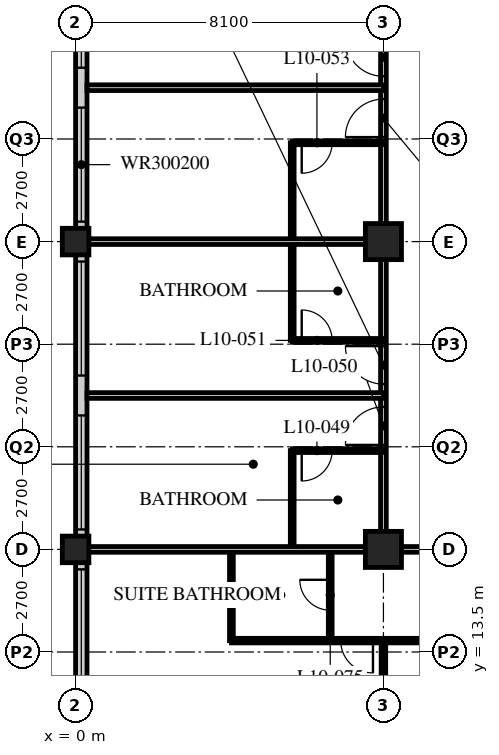
"""IFC4 building model, lengths in metres.
Left out: names, types, materials, properties, quantities, classifications, styles, units other than length and angle.
Written with IfcOpenShell. Run it as: python <this file> out.ifc"""

import sys

from ifc_helpers import new_model, si_unit, direction, frame, frame_2d, origin, origin_2d, place, context, subcontext, project, spatial, rectangle, hollow_rectangle, extrude, element, fill, save


model = new_model("IFC4")
c1 = context("Model", 3, precision=1e-05, world=origin(), true_north=direction((0.0, 1.0)))
c2 = subcontext(c1, "Body", "Model", "MODEL_VIEW")
j1 = project(units=[si_unit("LENGTHUNIT", "METRE"), si_unit("PLANEANGLEUNIT", "RADIAN")], contexts=[c1])
p1 = place(None, origin())
s1 = spatial("IfcSite", under=j1, at=p1, CompositionType="ELEMENT")
p2 = place(p1, origin())
s2 = spatial("IfcBuilding", under=s1, at=p2, CompositionType="ELEMENT")
p3 = place(p2, frame((0.0, 0.0, 46.6)))
s3 = spatial("IfcBuildingStorey", under=s2, at=p3, CompositionType="ELEMENT", Elevation=46.6)
for number, where, z_axis, x_axis in (
    (1, (0.0, 16.2, 0.0), (0.0, 0.0, 1.0), (1.0, 0.0, 0.0)),
    (2, (0.0, 24.3, 0.0), (0.0, 0.0, 1.0), (1.0, 0.0, 0.0)),
):
    element("IfcColumn", number, at=place(p3, frame(where, z_axis=z_axis, x_axis=x_axis)), inside=s3, PredefinedType="COLUMN", context=c2, shape_type="SweptSolid", body=[
        extrude(hollow_rectangle(XDim=0.7, YDim=0.7, WallThickness=0.06, at=origin_2d()), origin(), (0.0, 0.0, 1.0), 3.4),
    ])
for number, where, z_axis, x_axis in (
    (3, (8.1, 16.2, 0.0), (0.0, 0.0, 1.0), (1.0, 0.0, 0.0)),
    (4, (8.1, 24.3, 0.0), (0.0, 0.0, 1.0), (1.0, 0.0, 0.0)),
):
    element("IfcColumn", number, at=place(p3, frame(where, z_axis=z_axis, x_axis=x_axis)), inside=s3, PredefinedType="COLUMN", context=c2, shape_type="SweptSolid", body=[
        extrude(hollow_rectangle(XDim=0.95, YDim=0.95, WallThickness=0.095, at=origin_2d()), origin(), (0.0, 0.0, 1.0), 3.4),
    ])
p4 = place(p3, frame((0.15, 40.2, 0.0), z_axis=(0.0, 0.0, 1.0), x_axis=(0.0, -1.0, 0.0)))
e5 = element("IfcWall", 5, at=p4, inside=s3, PredefinedType="SOLIDWALL", context=c2, shape_type="SweptSolid", body=[
    extrude(rectangle(XDim=32.1, YDim=0.3, at=frame_2d((16.05, 0.0))), origin(), (0.0, 0.0, 1.0), 3.19),
])
p5 = place(p4, frame((0.225, 0.0, 0.9)))
e6 = element("IfcOpeningElement", 6, at=p5, cuts=e5, PredefinedType="OPENING", context=c2, shape_type="SweptSolid", body=[
    extrude(rectangle(XDim=3.0, YDim=2.0, at=frame_2d((1.5, 1.0))), frame((0.0, 0.16, 0.0), z_axis=(0.0, -1.0, 0.0), x_axis=(1.0, 0.0, 0.0)), (0.0, 0.0, 1.0), 0.32),
])
p6 = place(p4, frame((4.275, 0.0, 0.9)))
e7 = element("IfcOpeningElement", 7, at=p6, cuts=e5, PredefinedType="OPENING", context=c2, shape_type="SweptSolid", body=[
    extrude(rectangle(XDim=3.0, YDim=2.0, at=frame_2d((1.5, 1.0))), frame((0.0, 0.16, 0.0), z_axis=(0.0, -1.0, 0.0), x_axis=(1.0, 0.0, 0.0)), (0.0, 0.0, 1.0), 0.32),
])
p7 = place(p4, frame((8.325, 0.0, 0.9)))
e8 = element("IfcOpeningElement", 8, at=p7, cuts=e5, PredefinedType="OPENING", context=c2, shape_type="SweptSolid", body=[
    extrude(rectangle(XDim=3.0, YDim=2.0, at=frame_2d((1.5, 1.0))), frame((0.0, 0.16, 0.0), z_axis=(0.0, -1.0, 0.0), x_axis=(1.0, 0.0, 0.0)), (0.0, 0.0, 1.0), 0.32),
])
p8 = place(p4, frame((12.375, 0.0, 0.9)))
e9 = element("IfcOpeningElement", 9, at=p8, cuts=e5, PredefinedType="OPENING", context=c2, shape_type="SweptSolid", body=[
    extrude(rectangle(XDim=3.0, YDim=2.0, at=frame_2d((1.5, 1.0))), frame((0.0, 0.16, 0.0), z_axis=(0.0, -1.0, 0.0), x_axis=(1.0, 0.0, 0.0)), (0.0, 0.0, 1.0), 0.32),
])
p9 = place(p4, frame((16.425, 0.0, 0.9)))
e10 = element("IfcOpeningElement", 10, at=p9, cuts=e5, PredefinedType="OPENING", context=c2, shape_type="SweptSolid", body=[
    extrude(rectangle(XDim=3.0, YDim=2.0, at=frame_2d((1.5, 1.0))), frame((0.0, 0.16, 0.0), z_axis=(0.0, -1.0, 0.0), x_axis=(1.0, 0.0, 0.0)), (0.0, 0.0, 1.0), 0.32),
])
p10 = place(p4, frame((20.475, 0.0, 0.9)))
e11 = element("IfcOpeningElement", 11, at=p10, cuts=e5, PredefinedType="OPENING", context=c2, shape_type="SweptSolid", body=[
    extrude(rectangle(XDim=3.0, YDim=2.0, at=frame_2d((1.5, 1.0))), frame((0.0, 0.16, 0.0), z_axis=(0.0, -1.0, 0.0), x_axis=(1.0, 0.0, 0.0)), (0.0, 0.0, 1.0), 0.32),
])
p11 = place(p4, frame((24.525, 0.0, 0.9)))
e12 = element("IfcOpeningElement", 12, at=p11, cuts=e5, PredefinedType="OPENING", context=c2, shape_type="SweptSolid", body=[
    extrude(rectangle(XDim=3.0, YDim=2.0, at=frame_2d((1.5, 1.0))), frame((0.0, 0.16, 0.0), z_axis=(0.0, -1.0, 0.0), x_axis=(1.0, 0.0, 0.0)), (0.0, 0.0, 1.0), 0.32),
])
p12 = place(p4, frame((28.575, 0.0, 0.9)))
e13 = element("IfcOpeningElement", 13, at=p12, cuts=e5, PredefinedType="OPENING", context=c2, shape_type="SweptSolid", body=[
    extrude(rectangle(XDim=3.0, YDim=2.0, at=frame_2d((1.5, 1.0))), frame((0.0, 0.16, 0.0), z_axis=(0.0, -1.0, 0.0), x_axis=(1.0, 0.0, 0.0)), (0.0, 0.0, 1.0), 0.32),
])
p13 = place(p3, frame((8.1, 16.2, 0.0), z_axis=(0.0, 0.0, 1.0), x_axis=(1.0, 0.0, 0.0)))
e14 = element("IfcWall", 14, at=p13, inside=s3, PredefinedType="PARTITIONING", context=c2, shape_type="SweptSolid", body=[
    extrude(rectangle(XDim=40.5, YDim=0.15, at=frame_2d((20.25, 0.0))), origin(), (0.0, 0.0, 1.0), 2.578),
])
p14 = place(p13, frame((4.35, 0.0, 0.0)))
e15 = element("IfcOpeningElement", 15, at=p14, cuts=e14, PredefinedType="OPENING", context=c2, shape_type="SweptSolid", body=[
    extrude(rectangle(XDim=1.0, YDim=2.1, at=frame_2d((0.5, 1.05))), frame((0.0, 0.085, 0.0), z_axis=(0.0, -1.0, 0.0), x_axis=(1.0, 0.0, 0.0)), (0.0, 0.0, 1.0), 0.17),
])
p15 = place(p13, frame((10.85, 0.0, 0.0)))
e16 = element("IfcOpeningElement", 16, at=p15, cuts=e14, PredefinedType="OPENING", context=c2, shape_type="SweptSolid", body=[
    extrude(rectangle(XDim=1.0, YDim=2.1, at=frame_2d((0.5, 1.05))), frame((0.0, 0.085, 0.0), z_axis=(0.0, -1.0, 0.0), x_axis=(1.0, 0.0, 0.0)), (0.0, 0.0, 1.0), 0.17),
])
p16 = place(p13, frame((12.75, 0.0, 0.0)))
e17 = element("IfcOpeningElement", 17, at=p16, cuts=e14, PredefinedType="OPENING", context=c2, shape_type="SweptSolid", body=[
    extrude(rectangle(XDim=1.0, YDim=2.1, at=frame_2d((0.5, 1.05))), frame((0.0, 0.085, 0.0), z_axis=(0.0, -1.0, 0.0), x_axis=(1.0, 0.0, 0.0)), (0.0, 0.0, 1.0), 0.17),
])
p17 = place(p13, frame((18.95, 0.0, 0.0)))
e18 = element("IfcOpeningElement", 18, at=p17, cuts=e14, PredefinedType="OPENING", context=c2, shape_type="SweptSolid", body=[
    extrude(rectangle(XDim=1.0, YDim=2.1, at=frame_2d((0.5, 1.05))), frame((0.0, 0.085, 0.0), z_axis=(0.0, -1.0, 0.0), x_axis=(1.0, 0.0, 0.0)), (0.0, 0.0, 1.0), 0.17),
])
p18 = place(p13, frame((20.55, 0.0, 0.0)))
e19 = element("IfcOpeningElement", 19, at=p18, cuts=e14, PredefinedType="OPENING", context=c2, shape_type="SweptSolid", body=[
    extrude(rectangle(XDim=1.0, YDim=2.1, at=frame_2d((0.5, 1.05))), frame((0.0, 0.085, 0.0), z_axis=(0.0, -1.0, 0.0), x_axis=(1.0, 0.0, 0.0)), (0.0, 0.0, 1.0), 0.17),
])
p19 = place(p13, frame((27.05, 0.0, 0.0)))
e20 = element("IfcOpeningElement", 20, at=p19, cuts=e14, PredefinedType="OPENING", context=c2, shape_type="SweptSolid", body=[
    extrude(rectangle(XDim=1.0, YDim=2.1, at=frame_2d((0.5, 1.05))), frame((0.0, 0.085, 0.0), z_axis=(0.0, -1.0, 0.0), x_axis=(1.0, 0.0, 0.0)), (0.0, 0.0, 1.0), 0.17),
])
p20 = place(p13, frame((28.95, 0.0, 0.0)))
e21 = element("IfcOpeningElement", 21, at=p20, cuts=e14, PredefinedType="OPENING", context=c2, shape_type="SweptSolid", body=[
    extrude(rectangle(XDim=1.0, YDim=2.1, at=frame_2d((0.5, 1.05))), frame((0.0, 0.085, 0.0), z_axis=(0.0, -1.0, 0.0), x_axis=(1.0, 0.0, 0.0)), (0.0, 0.0, 1.0), 0.17),
])
p21 = place(p13, frame((34.85, 0.0, 0.0)))
e22 = element("IfcOpeningElement", 22, at=p21, cuts=e14, PredefinedType="OPENING", context=c2, shape_type="SweptSolid", body=[
    extrude(rectangle(XDim=1.0, YDim=2.1, at=frame_2d((0.5, 1.05))), frame((0.0, 0.085, 0.0), z_axis=(0.0, -1.0, 0.0), x_axis=(1.0, 0.0, 0.0)), (0.0, 0.0, 1.0), 0.17),
])
p22 = place(p13, frame((1.525, 0.0, 0.0)))
e23 = element("IfcOpeningElement", 23, at=p22, cuts=e14, PredefinedType="OPENING", context=c2, shape_type="SweptSolid", body=[
    extrude(rectangle(XDim=1.0, YDim=2.1, at=frame_2d((0.5, 1.05))), frame((0.0, 0.085, 0.0), z_axis=(0.0, -1.0, 0.0), x_axis=(1.0, 0.0, 0.0)), (0.0, 0.0, 1.0), 0.17),
])
p23 = place(p13, frame((37.975, 0.0, 0.0)))
e24 = element("IfcOpeningElement", 24, at=p23, cuts=e14, PredefinedType="OPENING", context=c2, shape_type="SweptSolid", body=[
    extrude(rectangle(XDim=1.0, YDim=2.1, at=frame_2d((0.5, 1.05))), frame((0.0, 0.085, 0.0), z_axis=(0.0, -1.0, 0.0), x_axis=(1.0, 0.0, 0.0)), (0.0, 0.0, 1.0), 0.17),
])
p24 = place(p3, frame((8.1, 16.2, 0.0), z_axis=(0.0, 0.0, 1.0), x_axis=(0.0, 1.0, 0.0)))
e25 = element("IfcWall", 25, at=p24, inside=s3, PredefinedType="PARTITIONING", context=c2, shape_type="SweptSolid", body=[
    extrude(rectangle(XDim=26.1, YDim=0.15, at=frame_2d((13.05, 0.0))), origin(), (0.0, 0.0, 1.0), 2.578),
])
p25 = place(p24, frame((2.75, 0.0, 0.0)))
e26 = element("IfcOpeningElement", 26, at=p25, cuts=e25, PredefinedType="OPENING", context=c2, shape_type="SweptSolid", body=[
    extrude(rectangle(XDim=1.0, YDim=2.1, at=frame_2d((0.5, 1.05))), frame((0.0, 0.085, 0.0), z_axis=(0.0, -1.0, 0.0), x_axis=(1.0, 0.0, 0.0)), (0.0, 0.0, 1.0), 0.17),
])
p26 = place(p24, frame((4.35, 0.0, 0.0)))
e27 = element("IfcOpeningElement", 27, at=p26, cuts=e25, PredefinedType="OPENING", context=c2, shape_type="SweptSolid", body=[
    extrude(rectangle(XDim=1.0, YDim=2.1, at=frame_2d((0.5, 1.05))), frame((0.0, 0.085, 0.0), z_axis=(0.0, -1.0, 0.0), x_axis=(1.0, 0.0, 0.0)), (0.0, 0.0, 1.0), 0.17),
])
p27 = place(p24, frame((10.85, 0.0, 0.0)))
e28 = element("IfcOpeningElement", 28, at=p27, cuts=e25, PredefinedType="OPENING", context=c2, shape_type="SweptSolid", body=[
    extrude(rectangle(XDim=1.0, YDim=2.1, at=frame_2d((0.5, 1.05))), frame((0.0, 0.085, 0.0), z_axis=(0.0, -1.0, 0.0), x_axis=(1.0, 0.0, 0.0)), (0.0, 0.0, 1.0), 0.17),
])
p28 = place(p24, frame((12.45, 0.0, 0.0)))
e29 = element("IfcOpeningElement", 29, at=p28, cuts=e25, PredefinedType="OPENING", context=c2, shape_type="SweptSolid", body=[
    extrude(rectangle(XDim=1.0, YDim=2.1, at=frame_2d((0.5, 1.05))), frame((0.0, 0.085, 0.0), z_axis=(0.0, -1.0, 0.0), x_axis=(1.0, 0.0, 0.0)), (0.0, 0.0, 1.0), 0.17),
])
p29 = place(p24, frame((18.65, 0.0, 0.0)))
e30 = element("IfcOpeningElement", 30, at=p29, cuts=e25, PredefinedType="OPENING", context=c2, shape_type="SweptSolid", body=[
    extrude(rectangle(XDim=1.0, YDim=2.1, at=frame_2d((0.5, 1.05))), frame((0.0, 0.085, 0.0), z_axis=(0.0, -1.0, 0.0), x_axis=(1.0, 0.0, 0.0)), (0.0, 0.0, 1.0), 0.17),
])
p30 = place(p24, frame((22.7, 0.0, 0.0)))
e31 = element("IfcOpeningElement", 31, at=p30, cuts=e25, PredefinedType="OPENING", context=c2, shape_type="SweptSolid", body=[
    extrude(rectangle(XDim=1.0, YDim=2.1, at=frame_2d((0.5, 1.05))), frame((0.0, 0.085, 0.0), z_axis=(0.0, -1.0, 0.0), x_axis=(1.0, 0.0, 0.0)), (0.0, 0.0, 1.0), 0.17),
])
p31 = place(p3, frame((5.7, 16.2, 0.0), z_axis=(0.0, 0.0, 1.0), x_axis=(0.0, 1.0, 0.0)))
e32 = element("IfcWall", 32, at=p31, inside=s3, PredefinedType="PARTITIONING", context=c2, shape_type="SweptSolid", body=[
    extrude(rectangle(XDim=2.6, YDim=0.1, at=frame_2d((1.3, 0.0))), origin(), (0.0, 0.0, 1.0), 3.19),
])
p32 = place(p3, frame((8.1, 18.8, 0.0), z_axis=(0.0, 0.0, 1.0), x_axis=(-1.0, 0.0, 0.0)))
e33 = element("IfcWall", 33, at=p32, inside=s3, PredefinedType="PARTITIONING", context=c2, shape_type="SweptSolid", body=[
    extrude(rectangle(XDim=2.4, YDim=0.1, at=frame_2d((1.2, 0.0))), origin(), (0.0, 0.0, 1.0), 3.19),
])
p33 = place(p32, frame((1.35, 0.0, 0.0)))
e34 = element("IfcOpeningElement", 34, at=p33, cuts=e33, PredefinedType="OPENING", context=c2, shape_type="SweptSolid", body=[
    extrude(rectangle(XDim=0.8, YDim=2.1, at=frame_2d((0.4, 1.05))), frame((0.0, 0.06, 0.0), z_axis=(0.0, -1.0, 0.0), x_axis=(1.0, 0.0, 0.0)), (0.0, 0.0, 1.0), 0.12),
])
p34 = place(p3, frame((8.1, 20.25, 0.0), z_axis=(0.0, 0.0, 1.0), x_axis=(-1.0, 0.0, 0.0)))
e35 = element("IfcWall", 35, at=p34, inside=s3, PredefinedType="PARTITIONING", context=c2, shape_type="SweptSolid", body=[
    extrude(rectangle(XDim=7.8, YDim=0.15, at=frame_2d((3.9, 0.0))), origin(), (0.0, 0.0, 1.0), 3.19),
])
p35 = place(p3, frame((5.7, 21.7, 0.0), z_axis=(0.0, 0.0, 1.0), x_axis=(0.0, 1.0, 0.0)))
e36 = element("IfcWall", 36, at=p35, inside=s3, PredefinedType="PARTITIONING", context=c2, shape_type="SweptSolid", body=[
    extrude(rectangle(XDim=5.2, YDim=0.1, at=frame_2d((2.6, 0.0))), origin(), (0.0, 0.0, 1.0), 3.19),
])
p36 = place(p3, frame((8.1, 21.7, 0.0), z_axis=(0.0, 0.0, 1.0), x_axis=(-1.0, 0.0, 0.0)))
e37 = element("IfcWall", 37, at=p36, inside=s3, PredefinedType="PARTITIONING", context=c2, shape_type="SweptSolid", body=[
    extrude(rectangle(XDim=2.4, YDim=0.1, at=frame_2d((1.2, 0.0))), origin(), (0.0, 0.0, 1.0), 3.19),
])
p37 = place(p36, frame((1.35, 0.0, 0.0)))
e38 = element("IfcOpeningElement", 38, at=p37, cuts=e37, PredefinedType="OPENING", context=c2, shape_type="SweptSolid", body=[
    extrude(rectangle(XDim=0.8, YDim=2.1, at=frame_2d((0.4, 1.05))), frame((0.0, 0.06, 0.0), z_axis=(0.0, -1.0, 0.0), x_axis=(1.0, 0.0, 0.0)), (0.0, 0.0, 1.0), 0.12),
])
p38 = place(p3, frame((8.1, 24.3, 0.0), z_axis=(0.0, 0.0, 1.0), x_axis=(-1.0, 0.0, 0.0)))
e39 = element("IfcWall", 39, at=p38, inside=s3, PredefinedType="PARTITIONING", context=c2, shape_type="SweptSolid", body=[
    extrude(rectangle(XDim=7.8, YDim=0.15, at=frame_2d((3.9, 0.0))), origin(), (0.0, 0.0, 1.0), 2.578),
])
p39 = place(p3, frame((8.1, 26.9, 0.0), z_axis=(0.0, 0.0, 1.0), x_axis=(-1.0, 0.0, 0.0)))
e40 = element("IfcWall", 40, at=p39, inside=s3, PredefinedType="PARTITIONING", context=c2, shape_type="SweptSolid", body=[
    extrude(rectangle(XDim=2.4, YDim=0.1, at=frame_2d((1.2, 0.0))), origin(), (0.0, 0.0, 1.0), 3.19),
])
p40 = place(p39, frame((1.35, 0.0, 0.0)))
e41 = element("IfcOpeningElement", 41, at=p40, cuts=e40, PredefinedType="OPENING", context=c2, shape_type="SweptSolid", body=[
    extrude(rectangle(XDim=0.8, YDim=2.1, at=frame_2d((0.4, 1.05))), frame((0.0, 0.06, 0.0), z_axis=(0.0, -1.0, 0.0), x_axis=(1.0, 0.0, 0.0)), (0.0, 0.0, 1.0), 0.12),
])
p41 = place(p3, frame((8.1, 28.35, 0.0), z_axis=(0.0, 0.0, 1.0), x_axis=(-1.0, 0.0, 0.0)))
e42 = element("IfcWall", 42, at=p41, inside=s3, PredefinedType="PARTITIONING", context=c2, shape_type="SweptSolid", body=[
    extrude(rectangle(XDim=7.8, YDim=0.15, at=frame_2d((3.9, 0.0))), origin(), (0.0, 0.0, 1.0), 3.19),
])
p42 = place(p3, frame((6.7, 16.2, 0.0), z_axis=(0.0, 0.0, 1.0), x_axis=(0.0, -1.0, 0.0)))
e43 = element("IfcWall", 43, at=p42, inside=s3, PredefinedType="PARTITIONING", context=c2, shape_type="SweptSolid", body=[
    extrude(rectangle(XDim=2.4, YDim=0.1, at=frame_2d((1.2, 0.0))), origin(), (0.0, 0.0, 1.0), 3.19),
])
p43 = place(p42, frame((0.8, 0.0, 0.0)))
e44 = element("IfcOpeningElement", 44, at=p43, cuts=e43, PredefinedType="OPENING", context=c2, shape_type="SweptSolid", body=[
    extrude(rectangle(XDim=0.8, YDim=2.1, at=frame_2d((0.4, 1.05))), frame((0.0, 0.06, 0.0), z_axis=(0.0, -1.0, 0.0), x_axis=(1.0, 0.0, 0.0)), (0.0, 0.0, 1.0), 0.12),
])
p44 = place(p3, frame((4.1, 16.2, 0.0), z_axis=(0.0, 0.0, 1.0), x_axis=(0.0, -1.0, 0.0)))
e45 = element("IfcWall", 45, at=p44, inside=s3, PredefinedType="PARTITIONING", context=c2, shape_type="SweptSolid", body=[
    extrude(rectangle(XDim=2.4, YDim=0.1, at=frame_2d((1.2, 0.0))), origin(), (0.0, 0.0, 1.0), 3.19),
])
p45 = place(p3, frame((4.1, 13.8, 0.0), z_axis=(0.0, 0.0, 1.0), x_axis=(1.0, 0.0, 0.0)))
e46 = element("IfcWall", 46, at=p45, inside=s3, PredefinedType="PARTITIONING", context=c2, shape_type="SweptSolid", body=[
    extrude(rectangle(XDim=8.05, YDim=0.12, at=frame_2d((4.025, 0.0))), origin(), (0.0, 0.0, 1.0), 3.19),
])
p46 = place(p45, frame((6.725, 0.0, 0.0)))
e47 = element("IfcOpeningElement", 47, at=p46, cuts=e46, PredefinedType="OPENING", context=c2, shape_type="SweptSolid", body=[
    extrude(rectangle(XDim=0.85, YDim=2.1, at=frame_2d((0.425, 1.05))), frame((0.0, 0.07, 0.0), z_axis=(0.0, -1.0, 0.0), x_axis=(1.0, 0.0, 0.0)), (0.0, 0.0, 1.0), 0.14),
])
p47 = place(p45, frame((2.875, 0.0, 0.0)))
e48 = element("IfcOpeningElement", 48, at=p47, cuts=e46, PredefinedType="OPENING", context=c2, shape_type="SweptSolid", body=[
    extrude(rectangle(XDim=0.85, YDim=2.1, at=frame_2d((0.425, 1.05))), frame((0.0, 0.07, 0.0), z_axis=(0.0, -1.0, 0.0), x_axis=(1.0, 0.0, 0.0)), (0.0, 0.0, 1.0), 0.14),
])
p48 = place(p3, frame((8.1, 13.8, 0.0), z_axis=(0.0, 0.0, 1.0), x_axis=(0.0, -1.0, 0.0)))
e49 = element("IfcWall", 49, at=p48, inside=s3, PredefinedType="PARTITIONING", context=c2, shape_type="SweptSolid", body=[
    extrude(rectangle(XDim=9.45, YDim=0.12, at=frame_2d((4.725, 0.0))), origin(), (0.0, 0.0, 1.0), 2.578),
])
p49 = place(p3, frame((0.3, 16.2, 0.0), z_axis=(0.0, 0.0, 1.0), x_axis=(1.0, 0.0, 0.0)))
e50 = element("IfcWall", 50, at=p49, inside=s3, PredefinedType="PARTITIONING", context=c2, shape_type="SweptSolid", body=[
    extrude(rectangle(XDim=7.8, YDim=0.15, at=frame_2d((3.9, 0.0))), origin(), (0.0, 0.0, 1.0), 2.578),
])
p50 = place(p7, origin())
e51 = element("IfcWindow", 51, at=p50, inside=s3, PartitioningType="SINGLE_PANEL", PredefinedType="WINDOW", context=c2, shape_type="SweptSolid", body=[
    extrude(rectangle(XDim=3.0, YDim=2.0, at=frame_2d((1.5, 1.0))), frame((0.0, 0.03, 0.0), z_axis=(0.0, -1.0, 0.0), x_axis=(1.0, 0.0, 0.0)), (0.0, 0.0, 1.0), 0.06),
])
fill(e8, e51)
p51 = place(p8, origin())
e52 = element("IfcWindow", 52, at=p51, inside=s3, PartitioningType="SINGLE_PANEL", PredefinedType="WINDOW", context=c2, shape_type="SweptSolid", body=[
    extrude(rectangle(XDim=3.0, YDim=2.0, at=frame_2d((1.5, 1.0))), frame((0.0, 0.03, 0.0), z_axis=(0.0, -1.0, 0.0), x_axis=(1.0, 0.0, 0.0)), (0.0, 0.0, 1.0), 0.06),
])
fill(e9, e52)
p52 = place(p9, origin())
e53 = element("IfcWindow", 53, at=p52, inside=s3, PartitioningType="SINGLE_PANEL", PredefinedType="WINDOW", context=c2, shape_type="SweptSolid", body=[
    extrude(rectangle(XDim=3.0, YDim=2.0, at=frame_2d((1.5, 1.0))), frame((0.0, 0.03, 0.0), z_axis=(0.0, -1.0, 0.0), x_axis=(1.0, 0.0, 0.0)), (0.0, 0.0, 1.0), 0.06),
])
fill(e10, e53)
p53 = place(p10, origin())
e54 = element("IfcWindow", 54, at=p53, inside=s3, PartitioningType="SINGLE_PANEL", PredefinedType="WINDOW", context=c2, shape_type="SweptSolid", body=[
    extrude(rectangle(XDim=3.0, YDim=2.0, at=frame_2d((1.5, 1.0))), frame((0.0, 0.03, 0.0), z_axis=(0.0, -1.0, 0.0), x_axis=(1.0, 0.0, 0.0)), (0.0, 0.0, 1.0), 0.06),
])
fill(e11, e54)
p54 = place(p11, origin())
e55 = element("IfcWindow", 55, at=p54, inside=s3, PartitioningType="SINGLE_PANEL", PredefinedType="WINDOW", context=c2, shape_type="SweptSolid", body=[
    extrude(rectangle(XDim=3.0, YDim=2.0, at=frame_2d((1.5, 1.0))), frame((0.0, 0.03, 0.0), z_axis=(0.0, -1.0, 0.0), x_axis=(1.0, 0.0, 0.0)), (0.0, 0.0, 1.0), 0.06),
])
fill(e12, e55)
p55 = place(p33, origin())
e56 = element("IfcDoor", 56, at=p55, inside=s3, OperationType="SINGLE_SWING_RIGHT", PredefinedType="DOOR", context=c2, shape_type="SweptSolid", body=[
    extrude(rectangle(XDim=0.8, YDim=2.1, at=frame_2d((0.4, 1.05))), frame((0.0, 0.025, 0.0), z_axis=(0.0, -1.0, 0.0), x_axis=(1.0, 0.0, 0.0)), (0.0, 0.0, 1.0), 0.05),
])
fill(e34, e56)
p56 = place(p25, origin())
e57 = element("IfcDoor", 57, at=p56, inside=s3, OperationType="SINGLE_SWING_LEFT", PredefinedType="DOOR", context=c2, shape_type="SweptSolid", body=[
    extrude(rectangle(XDim=1.0, YDim=2.1, at=frame_2d((0.5, 1.05))), frame((0.0, 0.025, 0.0), z_axis=(0.0, -1.0, 0.0), x_axis=(1.0, 0.0, 0.0)), (0.0, 0.0, 1.0), 0.05),
])
fill(e26, e57)
p57 = place(p37, origin())
e58 = element("IfcDoor", 58, at=p57, inside=s3, OperationType="SINGLE_SWING_LEFT", PredefinedType="DOOR", context=c2, shape_type="SweptSolid", body=[
    extrude(rectangle(XDim=0.8, YDim=2.1, at=frame_2d((0.4, 1.05))), frame((0.0, 0.025, 0.0), z_axis=(0.0, -1.0, 0.0), x_axis=(1.0, 0.0, 0.0)), (0.0, 0.0, 1.0), 0.05),
])
fill(e38, e58)
p58 = place(p26, origin())
e59 = element("IfcDoor", 59, at=p58, inside=s3, OperationType="SINGLE_SWING_RIGHT", PredefinedType="DOOR", context=c2, shape_type="SweptSolid", body=[
    extrude(rectangle(XDim=1.0, YDim=2.1, at=frame_2d((0.5, 1.05))), frame((0.0, 0.025, 0.0), z_axis=(0.0, -1.0, 0.0), x_axis=(1.0, 0.0, 0.0)), (0.0, 0.0, 1.0), 0.05),
])
fill(e27, e59)
p59 = place(p40, origin())
e60 = element("IfcDoor", 60, at=p59, inside=s3, OperationType="SINGLE_SWING_RIGHT", PredefinedType="DOOR", context=c2, shape_type="SweptSolid", body=[
    extrude(rectangle(XDim=0.8, YDim=2.1, at=frame_2d((0.4, 1.05))), frame((0.0, 0.025, 0.0), z_axis=(0.0, -1.0, 0.0), x_axis=(1.0, 0.0, 0.0)), (0.0, 0.0, 1.0), 0.05),
])
fill(e41, e60)
p60 = place(p27, origin())
e61 = element("IfcDoor", 61, at=p60, inside=s3, OperationType="SINGLE_SWING_LEFT", PredefinedType="DOOR", context=c2, shape_type="SweptSolid", body=[
    extrude(rectangle(XDim=1.0, YDim=2.1, at=frame_2d((0.5, 1.05))), frame((0.0, 0.025, 0.0), z_axis=(0.0, -1.0, 0.0), x_axis=(1.0, 0.0, 0.0)), (0.0, 0.0, 1.0), 0.05),
])
fill(e28, e61)
p61 = place(p28, origin())
e62 = element("IfcDoor", 62, at=p61, inside=s3, OperationType="SINGLE_SWING_RIGHT", PredefinedType="DOOR", context=c2, shape_type="SweptSolid", body=[
    extrude(rectangle(XDim=1.0, YDim=2.1, at=frame_2d((0.5, 1.05))), frame((0.0, 0.025, 0.0), z_axis=(0.0, -1.0, 0.0), x_axis=(1.0, 0.0, 0.0)), (0.0, 0.0, 1.0), 0.05),
])
fill(e29, e62)
p62 = place(p43, origin())
e63 = element("IfcDoor", 63, at=p62, inside=s3, OperationType="SINGLE_SWING_RIGHT", PredefinedType="DOOR", context=c2, shape_type="SweptSolid", body=[
    extrude(rectangle(XDim=0.8, YDim=2.1, at=frame_2d((0.4, 1.05))), frame((0.0, 0.025, 0.0), z_axis=(0.0, -1.0, 0.0), x_axis=(1.0, 0.0, 0.0)), (0.0, 0.0, 1.0), 0.05),
])
fill(e44, e63)
p63 = place(p47, origin())
e64 = element("IfcDoor", 64, at=p63, inside=s3, OperationType="SINGLE_SWING_LEFT", PredefinedType="DOOR", context=c2, shape_type="SweptSolid", body=[
    extrude(rectangle(XDim=0.85, YDim=2.1, at=frame_2d((0.425, 1.05))), frame((0.0, 0.025, 0.0), z_axis=(0.0, -1.0, 0.0), x_axis=(1.0, 0.0, 0.0)), (0.0, 0.0, 1.0), 0.05),
])
fill(e48, e64)
save(model, sys.argv[1])
